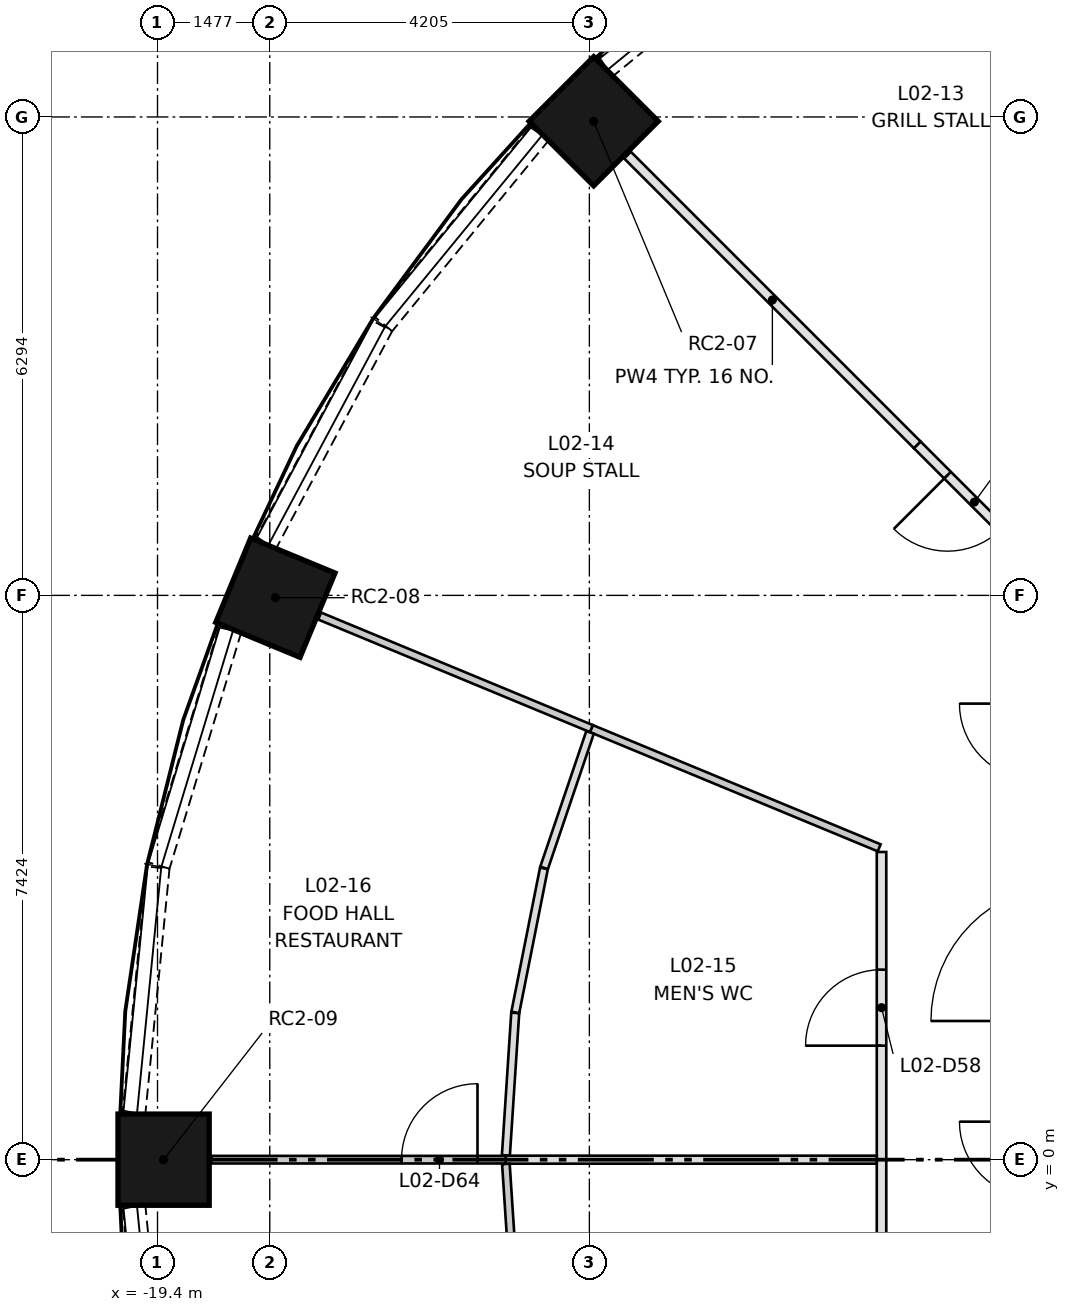
"""IFC4 building model, lengths in metres.
Left out: names, types, materials, properties, quantities, classifications, styles, units other than length and angle.
Written with IfcOpenShell. Run it as: python <this file> out.ifc"""

import sys

from ifc_helpers import new_model, si_unit, direction, frame, frame_2d, origin, origin_2d, place, context, subcontext, project, spatial, rectangle, extrude, element, fill, save


model = new_model("IFC4")
c1 = context("Model", 3, precision=1e-05, world=origin(), true_north=direction((0.0, 1.0)))
c2 = subcontext(c1, "Body", "Model", "MODEL_VIEW")
j1 = project(units=[si_unit("LENGTHUNIT", "METRE"), si_unit("PLANEANGLEUNIT", "RADIAN")], contexts=[c1])
p1 = place(None, origin())
s1 = spatial("IfcSite", under=j1, at=p1, CompositionType="ELEMENT")
p2 = place(p1, origin())
s2 = spatial("IfcBuilding", under=s1, at=p2, CompositionType="ELEMENT")
p3 = place(p2, frame((0.0, 0.0, 9.9)))
s3 = spatial("IfcBuildingStorey", under=s2, at=p3, CompositionType="ELEMENT", Elevation=9.9)
for number, where, z_axis, x_axis in (
    (1, (-13.661, 13.661, 0.0), (0.0, 0.0, 1.0), (-0.707, 0.707, 0.0)),
    (2, (-17.849, 7.394, 0.0), (0.0, 0.0, 1.0), (-0.924, 0.383, 0.0)),
    (3, (-19.32, 0.0, 0.0), (0.0, 0.0, 1.0), (-1.0, 0.0, 0.0)),
):
    element("IfcColumn", number, at=place(p3, frame(where, z_axis=z_axis, x_axis=x_axis)), inside=s3, PredefinedType="COLUMN", context=c2, shape_type="SweptSolid", body=[
        extrude(rectangle(XDim=1.2, YDim=1.2, at=origin_2d()), origin(), (0.0, 0.0, 1.0), 4.5),
    ])
for number, where, z_axis, x_axis in (
    (4, (-10.995, 16.428, 0.0), (0.0, 0.0, 1.0), (-0.773, -0.634, 0.0)),
    (5, (-14.371, 13.503, 0.0), (0.0, 0.0, 1.0), (-0.634, -0.773, 0.0)),
):
    element("IfcWall", number, at=place(p3, frame(where, z_axis=z_axis, x_axis=x_axis)), inside=s3, PredefinedType="SOLIDWALL", context=c2, shape_type="SweptSolid", body=[
        extrude(rectangle(XDim=3.245, YDim=0.3, at=frame_2d((1.623, 0.0))), origin(), (0.0, 0.0, 1.0), 0.45),
    ])
p4 = place(p3, frame((-16.445, 10.97, 0.0), z_axis=(0.0, 0.0, 1.0), x_axis=(-0.471220846392, -0.882015257196, 0.0)))
e6 = element("IfcWall", 6, at=p4, inside=s3, PredefinedType="SOLIDWALL", context=c2, shape_type="SweptSolid", body=[
    extrude(rectangle(XDim=3.244, YDim=0.3, at=frame_2d((1.622, 0.0))), origin(), (0.0, 0.0, 1.0), 0.45),
])
p5 = place(p3, frame((-18.443, 6.976, 0.0), z_axis=(0.0, 0.0, 1.0), x_axis=(-0.290418848098, -0.95689962518, 0.0)))
e7 = element("IfcWall", 7, at=p5, inside=s3, PredefinedType="SOLIDWALL", context=c2, shape_type="SweptSolid", body=[
    extrude(rectangle(XDim=3.244, YDim=0.3, at=frame_2d((1.622, 0.0))), origin(), (0.0, 0.0, 1.0), 0.45),
])
for number, where, z_axis, x_axis in (
    (8, (-19.392, 3.842, 0.0), (0.0, 0.0, 1.0), (-0.098, -0.995, 0.0)),
    (9, (-19.709, -0.613, 0.0), (0.0, 0.0, 1.0), (0.098, -0.995, 0.0)),
):
    element("IfcWall", number, at=place(p3, frame(where, z_axis=z_axis, x_axis=x_axis)), inside=s3, PredefinedType="SOLIDWALL", context=c2, shape_type="SweptSolid", body=[
        extrude(rectangle(XDim=3.245, YDim=0.3, at=frame_2d((1.623, 0.0))), origin(), (0.0, 0.0, 1.0), 0.45),
    ])
p6 = place(p3, frame((-7.874, 7.874, 0.0), z_axis=(0.0, 0.0, 1.0), x_axis=(-0.707106781187, 0.707106781187, 0.0)))
e10 = element("IfcWall", 10, at=p6, inside=s3, PredefinedType="PARTITIONING", context=c2, shape_type="SweptSolid", body=[
    extrude(rectangle(XDim=2.165, YDim=0.125, at=frame_2d((1.082, 0.0))), origin(), (0.0, 0.0, 1.0), 4.1),
])
p7 = place(p6, frame((0.6, 0.0, 0.0)))
e11 = element("IfcOpeningElement", 11, at=p7, cuts=e10, PredefinedType="OPENING", context=c2, shape_type="SweptSolid", body=[
    extrude(rectangle(XDim=1.0, YDim=2.1, at=frame_2d((0.5, 1.05))), frame((0.0, 0.073, 0.0), z_axis=(0.0, -1.0, 0.0), x_axis=(1.0, 0.0, 0.0)), (0.0, 0.0, 1.0), 0.145),
])
p8 = place(p3, frame((-9.874, 0.0, 0.0), z_axis=(0.0, 0.0, 1.0), x_axis=(0.0, 1.0, 0.0)))
e12 = element("IfcWall", 12, at=p8, inside=s3, PredefinedType="PARTITIONING", context=c2, shape_type="SweptSolid", body=[
    extrude(rectangle(XDim=4.048, YDim=0.125, at=frame_2d((2.024, 0.0))), origin(), (0.0, 0.0, 1.0), 4.1),
])
p9 = place(p8, frame((1.5, 0.0, 0.0)))
e13 = element("IfcOpeningElement", 13, at=p9, cuts=e12, PredefinedType="OPENING", context=c2, shape_type="SweptSolid", body=[
    extrude(rectangle(XDim=1.0, YDim=2.1, at=frame_2d((0.5, 1.05))), frame((0.0, 0.073, 0.0), z_axis=(0.0, -1.0, 0.0), x_axis=(1.0, 0.0, 0.0)), (0.0, 0.0, 1.0), 0.145),
])
p10 = place(p3, frame((-9.874, -4.09, 0.0), z_axis=(0.0, 0.0, 1.0), x_axis=(0.0, 1.0, 0.0)))
e14 = element("IfcWall", 14, at=p10, inside=s3, PredefinedType="PARTITIONING", context=c2, shape_type="SweptSolid", body=[
    extrude(rectangle(XDim=4.09, YDim=0.125, at=frame_2d((2.045, 0.0))), origin(), (0.0, 0.0, 1.0), 4.1),
])
p11 = place(p10, frame((1.5, 0.0, 0.0)))
e15 = element("IfcOpeningElement", 15, at=p11, cuts=e14, PredefinedType="OPENING", context=c2, shape_type="SweptSolid", body=[
    extrude(rectangle(XDim=1.0, YDim=2.1, at=frame_2d((0.5, 1.05))), frame((0.0, 0.073, 0.0), z_axis=(0.0, -1.0, 0.0), x_axis=(1.0, 0.0, 0.0)), (0.0, 0.0, 1.0), 0.145),
])
p12 = place(p3, frame((-9.405, 9.405, 0.0), z_axis=(0.0, 0.0, 1.0), x_axis=(-0.707106781187, 0.707106781187, 0.0)))
e16 = element("IfcWall", 16, at=p12, inside=s3, PredefinedType="PARTITIONING", context=c2, shape_type="SweptSolid", body=[
    extrude(rectangle(XDim=5.39, YDim=0.125, at=frame_2d((2.695, 0.0))), origin(), (0.0, 0.0, 1.0), 4.1),
])
p13 = place(p3, frame((-9.905, 4.103, 0.0), z_axis=(0.0, 0.0, 1.0), x_axis=(-0.923885444896, 0.382669158294, 0.0)))
e17 = element("IfcWall", 17, at=p13, inside=s3, PredefinedType="PARTITIONING", context=c2, shape_type="SweptSolid", body=[
    extrude(rectangle(XDim=4.099, YDim=0.1, at=frame_2d((2.05, 0.0))), origin(), (0.0, 0.0, 1.0), 4.1),
])
p14 = place(p3, frame((-13.692, 5.671, 0.0), z_axis=(0.0, 0.0, 1.0), x_axis=(-0.923883048049, 0.382674944996, 0.0)))
e18 = element("IfcWall", 18, at=p14, inside=s3, PredefinedType="PARTITIONING", context=c2, shape_type="SweptSolid", body=[
    extrude(rectangle(XDim=3.87, YDim=0.1, at=frame_2d((1.935, 0.0))), origin(), (0.0, 0.0, 1.0), 4.1),
])
p15 = place(p3, frame((-14.816, 0.056, 0.0), z_axis=(0.0, 0.0, 1.0), x_axis=(0.065484143156, 0.997853610003, 0.0)))
e19 = element("IfcWall", 19, at=p15, inside=s3, PredefinedType="PARTITIONING", context=c2, shape_type="SweptSolid", body=[
    extrude(rectangle(XDim=1.879, YDim=0.105, at=frame_2d((0.939, 0.0))), origin(), (0.0, 0.0, 1.0), 4.1),
])
p16 = place(p3, frame((-14.692, 1.938, 0.0), z_axis=(0.0, 0.0, 1.0), x_axis=(0.195022239668, 0.980798820368, 0.0)))
e20 = element("IfcWall", 20, at=p16, inside=s3, PredefinedType="PARTITIONING", context=c2, shape_type="SweptSolid", body=[
    extrude(rectangle(XDim=1.932, YDim=0.105, at=frame_2d((0.966, 0.0))), origin(), (0.0, 0.0, 1.0), 4.1),
])
p17 = place(p3, frame((-14.314, 3.839, 0.0), z_axis=(0.0, 0.0, 1.0), x_axis=(0.321556084027, 0.946890534764, 0.0)))
e21 = element("IfcWall", 21, at=p17, inside=s3, PredefinedType="PARTITIONING", context=c2, shape_type="SweptSolid", body=[
    extrude(rectangle(XDim=1.881, YDim=0.105, at=frame_2d((0.941, 0.0))), origin(), (0.0, 0.0, 1.0), 4.1),
])
p18 = place(p3, frame((-9.937, 0.0, 0.0), z_axis=(0.0, 0.0, 1.0), x_axis=(-1.0, 0.0, 0.0)))
e22 = element("IfcWall", 22, at=p18, inside=s3, PredefinedType="PARTITIONING", context=c2, shape_type="SweptSolid", body=[
    extrude(rectangle(XDim=4.884, YDim=0.105, at=frame_2d((2.442, 0.0))), origin(), (0.0, 0.0, 1.0), 4.1),
])
p19 = place(p3, frame((-18.69, 0.0, 0.0), z_axis=(0.0, 0.0, 1.0), x_axis=(1.0, 0.0, 0.0)))
e23 = element("IfcWall", 23, at=p19, inside=s3, PredefinedType="PARTITIONING", context=c2, shape_type="SweptSolid", body=[
    extrude(rectangle(XDim=3.87, YDim=0.1, at=frame_2d((1.935, 0.0))), origin(), (0.0, 0.0, 1.0), 4.1),
])
p20 = place(p19, frame((2.5, 0.0, 0.0)))
e24 = element("IfcOpeningElement", 24, at=p20, cuts=e23, PredefinedType="OPENING", context=c2, shape_type="SweptSolid", body=[
    extrude(rectangle(XDim=1.0, YDim=2.1, at=frame_2d((0.5, 1.05))), frame((0.0, 0.06, 0.0), z_axis=(0.0, -1.0, 0.0), x_axis=(1.0, 0.0, 0.0)), (0.0, 0.0, 1.0), 0.12),
])
p21 = place(p3, frame((-14.816, -0.056, 0.0), z_axis=(0.0, 0.0, 1.0), x_axis=(0.065475654237, -0.997854167052, 0.0)))
e25 = element("IfcWall", 25, at=p21, inside=s3, PredefinedType="PARTITIONING", context=c2, shape_type="SweptSolid", body=[
    extrude(rectangle(XDim=1.879, YDim=0.1, at=frame_2d((0.94, 0.0))), origin(), (0.0, 0.0, 1.0), 4.1),
])
p22 = place(p7, origin())
e26 = element("IfcDoor", 26, at=p22, inside=s3, OperationType="SINGLE_SWING_RIGHT", PredefinedType="DOOR", context=c2, shape_type="SweptSolid", body=[
    extrude(rectangle(XDim=1.0, YDim=2.1, at=frame_2d((0.5, 1.05))), frame((0.0, 0.025, 0.0), z_axis=(0.0, -1.0, 0.0), x_axis=(1.0, 0.0, 0.0)), (0.0, 0.0, 1.0), 0.05),
])
fill(e11, e26)
p23 = place(p9, origin())
e27 = element("IfcDoor", 27, at=p23, inside=s3, OperationType="SINGLE_SWING_LEFT", PredefinedType="DOOR", context=c2, shape_type="SweptSolid", body=[
    extrude(rectangle(XDim=1.0, YDim=2.1, at=frame_2d((0.5, 1.05))), frame((0.0, 0.025, 0.0), z_axis=(0.0, -1.0, 0.0), x_axis=(1.0, 0.0, 0.0)), (0.0, 0.0, 1.0), 0.05),
])
fill(e13, e27)
p24 = place(p20, origin())
e28 = element("IfcDoor", 28, at=p24, inside=s3, OperationType="SINGLE_SWING_RIGHT", PredefinedType="DOOR", context=c2, shape_type="SweptSolid", body=[
    extrude(rectangle(XDim=1.0, YDim=2.1, at=frame_2d((0.5, 1.05))), frame((0.0, 0.025, 0.0), z_axis=(0.0, -1.0, 0.0), x_axis=(1.0, 0.0, 0.0)), (0.0, 0.0, 1.0), 0.05),
])
fill(e24, e28)
save(model, sys.argv[1])
